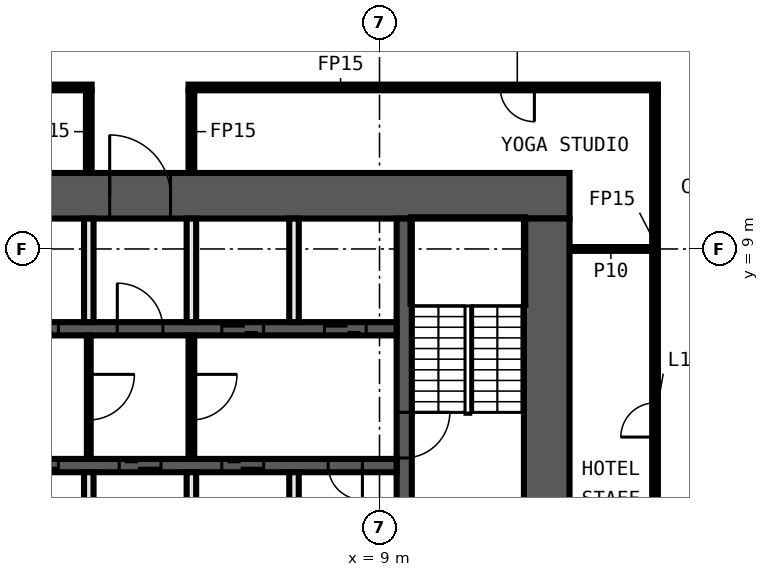
"""IFC4 building model, lengths in metres.
Left out: names, types, materials, properties, quantities, classifications, styles, units other than length and angle.
Written with IfcOpenShell. Run it as: python <this file> out.ifc"""

import sys

from ifc_helpers import new_model, si_unit, direction, frame, frame_2d, origin, place, context, subcontext, project, spatial, rectangle, extrude, element, fill, save


model = new_model("IFC4")
c1 = context("Model", 3, precision=1e-05, world=origin(), true_north=direction((0.0, 1.0)))
c2 = subcontext(c1, "Body", "Model", "MODEL_VIEW")
j1 = project(units=[si_unit("LENGTHUNIT", "METRE"), si_unit("PLANEANGLEUNIT", "RADIAN")], contexts=[c1])
p1 = place(None, origin())
s1 = spatial("IfcSite", under=j1, at=p1, CompositionType="ELEMENT")
p2 = place(p1, origin())
s2 = spatial("IfcBuilding", under=s1, at=p2, CompositionType="ELEMENT")
p3 = place(p2, frame((0.0, 0.0, 73.6)))
s3 = spatial("IfcBuildingStorey", under=s2, at=p3, CompositionType="ELEMENT", Elevation=73.6)
p4 = place(p3, frame((14.0, 9.0, 0.0), z_axis=(0.0, 0.0, 1.0), x_axis=(1.0, 0.0, 0.0)))
e1 = element("IfcWall", 1, at=p4, inside=s3, PredefinedType="PARTITIONING", context=c2, shape_type="SweptSolid", body=[
    extrude(rectangle(XDim=2.175, YDim=0.1, at=frame_2d((1.087, 0.0))), origin(), (0.0, 0.0, 1.0), 3.3),
])
p5 = place(p3, frame((1.425, 13.25, 0.0), z_axis=(0.0, 0.0, 1.0), x_axis=(-1.0, 0.0, 0.0)))
e2 = element("IfcWall", 2, at=p5, inside=s3, PredefinedType="PARTITIONING", context=c2, shape_type="SweptSolid", body=[
    extrude(rectangle(XDim=17.75, YDim=0.15, at=frame_2d((8.875, 0.0))), origin(), (0.0, 0.0, 1.0), 3.3),
])
p6 = place(p5, frame((5.475, 0.0, 0.0)))
e3 = element("IfcOpeningElement", 3, at=p6, cuts=e2, PredefinedType="OPENING", context=c2, shape_type="SweptSolid", body=[
    extrude(rectangle(XDim=0.9, YDim=2.1, at=frame_2d((0.45, 1.05))), frame((0.0, 0.085, 0.0), z_axis=(0.0, -1.0, 0.0), x_axis=(1.0, 0.0, 0.0)), (0.0, 0.0, 1.0), 0.17),
])
p7 = place(p5, frame((13.6, 0.0, 0.0)))
e4 = element("IfcOpeningElement", 4, at=p7, cuts=e2, PredefinedType="OPENING", context=c2, shape_type="SweptSolid", body=[
    extrude(rectangle(XDim=0.9, YDim=2.1, at=frame_2d((0.45, 1.05))), frame((0.0, 0.085, 0.0), z_axis=(0.0, -1.0, 0.0), x_axis=(1.0, 0.0, 0.0)), (0.0, 0.0, 1.0), 0.17),
])
p8 = place(p3, frame((16.325, 13.25, 0.0), z_axis=(0.0, 0.0, 1.0), x_axis=(-1.0, 0.0, 0.0)))
e5 = element("IfcWall", 5, at=p8, inside=s3, PredefinedType="PARTITIONING", context=c2, shape_type="SweptSolid", body=[
    extrude(rectangle(XDim=12.35, YDim=0.15, at=frame_2d((6.175, 0.0))), origin(), (0.0, 0.0, 1.0), 3.3),
])
p9 = place(p8, frame((3.25, 0.0, 0.0)))
e6 = element("IfcOpeningElement", 6, at=p9, cuts=e5, PredefinedType="OPENING", context=c2, shape_type="SweptSolid", body=[
    extrude(rectangle(XDim=0.9, YDim=2.1, at=frame_2d((0.45, 1.05))), frame((0.0, 0.085, 0.0), z_axis=(0.0, -1.0, 0.0), x_axis=(1.0, 0.0, 0.0)), (0.0, 0.0, 1.0), 0.17),
])
p10 = place(p3, frame((16.25, -13.175, 0.0), z_axis=(0.0, 0.0, 1.0), x_axis=(0.0, 1.0, 0.0)))
e7 = element("IfcWall", 7, at=p10, inside=s3, PredefinedType="PARTITIONING", context=c2, shape_type="SweptSolid", body=[
    extrude(rectangle(XDim=26.35, YDim=0.15, at=frame_2d((13.175, 0.0))), origin(), (0.0, 0.0, 1.0), 3.3),
])
p11 = place(p10, frame((8.225, 0.0, 0.0)))
e8 = element("IfcOpeningElement", 8, at=p11, cuts=e7, PredefinedType="OPENING", context=c2, shape_type="SweptSolid", body=[
    extrude(rectangle(XDim=0.9, YDim=2.1, at=frame_2d((0.45, 1.05))), frame((0.0, 0.085, 0.0), z_axis=(0.0, -1.0, 0.0), x_axis=(1.0, 0.0, 0.0)), (0.0, 0.0, 1.0), 0.17),
])
p12 = place(p10, frame((17.225, 0.0, 0.0)))
e9 = element("IfcOpeningElement", 9, at=p12, cuts=e7, PredefinedType="OPENING", context=c2, shape_type="SweptSolid", body=[
    extrude(rectangle(XDim=0.9, YDim=2.1, at=frame_2d((0.45, 1.05))), frame((0.0, 0.085, 0.0), z_axis=(0.0, -1.0, 0.0), x_axis=(1.0, 0.0, 0.0)), (0.0, 0.0, 1.0), 0.17),
])
for number, where, z_axis, x_axis in (
    (10, (4.05, 11.0, 0.0), (0.0, 0.0, 1.0), (0.0, 1.0, 0.0)),
    (11, (1.35, 11.0, 0.0), (0.0, 0.0, 1.0), (0.0, 1.0, 0.0)),
):
    element("IfcWall", number, at=place(p3, frame(where, z_axis=z_axis, x_axis=x_axis)), inside=s3, PredefinedType="PARTITIONING", context=c2, shape_type="SweptSolid", body=[
        extrude(rectangle(XDim=2.175, YDim=0.15, at=frame_2d((1.087, 0.0))), origin(), (0.0, 0.0, 1.0), 3.3),
    ])
p13 = place(p3, frame((-14.0, 10.4, 0.0), z_axis=(0.0, 0.0, 1.0), x_axis=(1.0, 0.0, 0.0)))
e12 = element("IfcWall", 12, at=p13, inside=s3, PredefinedType="SHEAR", context=c2, shape_type="SweptSolid", body=[
    extrude(rectangle(XDim=28.0, YDim=1.2, at=frame_2d((14.0, 0.0))), origin(), (0.0, 0.0, 1.0), 3.3),
])
p14 = place(p13, frame((15.9, 0.0, 0.0)))
e13 = element("IfcOpeningElement", 13, at=p14, cuts=e12, PredefinedType="OPENING", context=c2, shape_type="SweptSolid", body=[
    extrude(rectangle(XDim=1.6, YDim=2.1, at=frame_2d((0.8, 1.05))), frame((0.0, 0.61, 0.0), z_axis=(0.0, -1.0, 0.0), x_axis=(1.0, 0.0, 0.0)), (0.0, 0.0, 1.0), 1.22),
])
p15 = place(p3, frame((13.4, 9.8, 0.0), z_axis=(0.0, 0.0, 1.0), x_axis=(0.0, -1.0, 0.0)))
e14 = element("IfcWall", 14, at=p15, inside=s3, PredefinedType="SHEAR", context=c2, shape_type="SweptSolid", body=[
    extrude(rectangle(XDim=19.6, YDim=1.2, at=frame_2d((9.8, 0.0))), origin(), (0.0, 0.0, 1.0), 3.3),
])
p16 = place(p3, frame((9.65, 9.8, 0.0), z_axis=(0.0, 0.0, 1.0), x_axis=(0.0, -1.0, 0.0)))
e15 = element("IfcWall", 15, at=p16, inside=s3, PredefinedType="SHEAR", context=c2, shape_type="SweptSolid", body=[
    extrude(rectangle(XDim=7.5, YDim=0.4, at=frame_2d((3.75, 0.0))), origin(), (0.0, 0.0, 1.0), 3.3),
])
p17 = place(p16, frame((5.1, 0.0, 0.0)))
e16 = element("IfcOpeningElement", 16, at=p17, cuts=e15, PredefinedType="OPENING", context=c2, shape_type="SweptSolid", body=[
    extrude(rectangle(XDim=1.2, YDim=2.1, at=frame_2d((0.6, 1.05))), frame((0.0, 0.21, 0.0), z_axis=(0.0, -1.0, 0.0), x_axis=(1.0, 0.0, 0.0)), (0.0, 0.0, 1.0), 0.42),
])
p18 = place(p3, frame((-9.45, 6.9, 0.0), z_axis=(0.0, 0.0, 1.0), x_axis=(1.0, 0.0, 0.0)))
e17 = element("IfcWall", 17, at=p18, inside=s3, PredefinedType="SHEAR", context=c2, shape_type="SweptSolid", body=[
    extrude(rectangle(XDim=18.9, YDim=0.35, at=frame_2d((9.45, 0.0))), origin(), (0.0, 0.0, 1.0), 3.3),
])
p19 = place(p18, frame((0.8, 0.0, 0.0)))
e18 = element("IfcOpeningElement", 18, at=p19, cuts=e17, PredefinedType="OPENING", context=c2, shape_type="SweptSolid", body=[
    extrude(rectangle(XDim=1.1, YDim=2.1, at=frame_2d((0.55, 1.05))), frame((0.0, 0.185, 0.0), z_axis=(0.0, -1.0, 0.0), x_axis=(1.0, 0.0, 0.0)), (0.0, 0.0, 1.0), 0.37),
])
p20 = place(p18, frame((3.5, 0.0, 0.0)))
e19 = element("IfcOpeningElement", 19, at=p20, cuts=e17, PredefinedType="OPENING", context=c2, shape_type="SweptSolid", body=[
    extrude(rectangle(XDim=1.1, YDim=2.1, at=frame_2d((0.55, 1.05))), frame((0.0, 0.185, 0.0), z_axis=(0.0, -1.0, 0.0), x_axis=(1.0, 0.0, 0.0)), (0.0, 0.0, 1.0), 0.37),
])
p21 = place(p18, frame((6.2, 0.0, 0.0)))
e20 = element("IfcOpeningElement", 20, at=p21, cuts=e17, PredefinedType="OPENING", context=c2, shape_type="SweptSolid", body=[
    extrude(rectangle(XDim=1.1, YDim=2.1, at=frame_2d((0.55, 1.05))), frame((0.0, 0.185, 0.0), z_axis=(0.0, -1.0, 0.0), x_axis=(1.0, 0.0, 0.0)), (0.0, 0.0, 1.0), 0.37),
])
p22 = place(p18, frame((8.9, 0.0, 0.0)))
e21 = element("IfcOpeningElement", 21, at=p22, cuts=e17, PredefinedType="OPENING", context=c2, shape_type="SweptSolid", body=[
    extrude(rectangle(XDim=1.1, YDim=2.1, at=frame_2d((0.55, 1.05))), frame((0.0, 0.185, 0.0), z_axis=(0.0, -1.0, 0.0), x_axis=(1.0, 0.0, 0.0)), (0.0, 0.0, 1.0), 0.37),
])
p23 = place(p18, frame((11.55, 0.0, 0.0)))
e22 = element("IfcOpeningElement", 22, at=p23, cuts=e17, PredefinedType="OPENING", context=c2, shape_type="SweptSolid", body=[
    extrude(rectangle(XDim=1.2, YDim=2.1, at=frame_2d((0.6, 1.05))), frame((0.0, 0.185, 0.0), z_axis=(0.0, -1.0, 0.0), x_axis=(1.0, 0.0, 0.0)), (0.0, 0.0, 1.0), 0.37),
])
p24 = place(p18, frame((14.3, 0.0, 0.0)))
e23 = element("IfcOpeningElement", 23, at=p24, cuts=e17, PredefinedType="OPENING", context=c2, shape_type="SweptSolid", body=[
    extrude(rectangle(XDim=1.1, YDim=2.1, at=frame_2d((0.55, 1.05))), frame((0.0, 0.185, 0.0), z_axis=(0.0, -1.0, 0.0), x_axis=(1.0, 0.0, 0.0)), (0.0, 0.0, 1.0), 0.37),
])
p25 = place(p18, frame((17.0, 0.0, 0.0)))
e24 = element("IfcOpeningElement", 24, at=p25, cuts=e17, PredefinedType="OPENING", context=c2, shape_type="SweptSolid", body=[
    extrude(rectangle(XDim=1.1, YDim=2.1, at=frame_2d((0.55, 1.05))), frame((0.0, 0.185, 0.0), z_axis=(0.0, -1.0, 0.0), x_axis=(1.0, 0.0, 0.0)), (0.0, 0.0, 1.0), 0.37),
])
p26 = place(p3, frame((9.45, 3.3, 0.0), z_axis=(0.0, 0.0, 1.0), x_axis=(-1.0, 0.0, 0.0)))
e25 = element("IfcWall", 25, at=p26, inside=s3, PredefinedType="SHEAR", context=c2, shape_type="SweptSolid", body=[
    extrude(rectangle(XDim=18.9, YDim=0.35, at=frame_2d((9.45, 0.0))), origin(), (0.0, 0.0, 1.0), 3.3),
])
p27 = place(p26, frame((17.0, 0.0, 0.0)))
e26 = element("IfcOpeningElement", 26, at=p27, cuts=e25, PredefinedType="OPENING", context=c2, shape_type="SweptSolid", body=[
    extrude(rectangle(XDim=1.1, YDim=2.1, at=frame_2d((0.55, 1.05))), frame((0.0, 0.185, 0.0), z_axis=(0.0, -1.0, 0.0), x_axis=(1.0, 0.0, 0.0)), (0.0, 0.0, 1.0), 0.37),
])
p28 = place(p26, frame((14.3, 0.0, 0.0)))
e27 = element("IfcOpeningElement", 27, at=p28, cuts=e25, PredefinedType="OPENING", context=c2, shape_type="SweptSolid", body=[
    extrude(rectangle(XDim=1.1, YDim=2.1, at=frame_2d((0.55, 1.05))), frame((0.0, 0.185, 0.0), z_axis=(0.0, -1.0, 0.0), x_axis=(1.0, 0.0, 0.0)), (0.0, 0.0, 1.0), 0.37),
])
p29 = place(p26, frame((11.6, 0.0, 0.0)))
e28 = element("IfcOpeningElement", 28, at=p29, cuts=e25, PredefinedType="OPENING", context=c2, shape_type="SweptSolid", body=[
    extrude(rectangle(XDim=1.1, YDim=2.1, at=frame_2d((0.55, 1.05))), frame((0.0, 0.185, 0.0), z_axis=(0.0, -1.0, 0.0), x_axis=(1.0, 0.0, 0.0)), (0.0, 0.0, 1.0), 0.37),
])
p30 = place(p26, frame((8.9, 0.0, 0.0)))
e29 = element("IfcOpeningElement", 29, at=p30, cuts=e25, PredefinedType="OPENING", context=c2, shape_type="SweptSolid", body=[
    extrude(rectangle(XDim=1.1, YDim=2.1, at=frame_2d((0.55, 1.05))), frame((0.0, 0.185, 0.0), z_axis=(0.0, -1.0, 0.0), x_axis=(1.0, 0.0, 0.0)), (0.0, 0.0, 1.0), 0.37),
])
p31 = place(p26, frame((6.2, 0.0, 0.0)))
e30 = element("IfcOpeningElement", 30, at=p31, cuts=e25, PredefinedType="OPENING", context=c2, shape_type="SweptSolid", body=[
    extrude(rectangle(XDim=1.1, YDim=2.1, at=frame_2d((0.55, 1.05))), frame((0.0, 0.185, 0.0), z_axis=(0.0, -1.0, 0.0), x_axis=(1.0, 0.0, 0.0)), (0.0, 0.0, 1.0), 0.37),
])
p32 = place(p26, frame((3.5, 0.0, 0.0)))
e31 = element("IfcOpeningElement", 31, at=p32, cuts=e25, PredefinedType="OPENING", context=c2, shape_type="SweptSolid", body=[
    extrude(rectangle(XDim=1.1, YDim=2.1, at=frame_2d((0.55, 1.05))), frame((0.0, 0.185, 0.0), z_axis=(0.0, -1.0, 0.0), x_axis=(1.0, 0.0, 0.0)), (0.0, 0.0, 1.0), 0.37),
])
p33 = place(p26, frame((0.9, 0.0, 0.0)))
e32 = element("IfcOpeningElement", 32, at=p33, cuts=e25, PredefinedType="OPENING", context=c2, shape_type="SweptSolid", body=[
    extrude(rectangle(XDim=0.9, YDim=2.1, at=frame_2d((0.45, 1.05))), frame((0.0, 0.185, 0.0), z_axis=(0.0, -1.0, 0.0), x_axis=(1.0, 0.0, 0.0)), (0.0, 0.0, 1.0), 0.37),
])
for number, where, z_axis, x_axis in (
    (33, (6.75, 0.4, 0.0), (0.0, 0.0, 1.0), (0.0, 1.0, 0.0)),
    (34, (6.75, 7.075, 0.0), (0.0, 0.0, 1.0), (0.0, 1.0, 0.0)),
):
    element("IfcWall", number, at=place(p3, frame(where, z_axis=z_axis, x_axis=x_axis)), inside=s3, PredefinedType="SOLIDWALL", context=c2, shape_type="SweptSolid", body=[
        extrude(rectangle(XDim=2.725, YDim=0.25, at=frame_2d((1.363, 0.0))), origin(), (0.0, 0.0, 1.0), 3.3),
    ])
p34 = place(p3, frame((4.05, 6.725, 0.0), z_axis=(0.0, 0.0, 1.0), x_axis=(0.0, -1.0, 0.0)))
e35 = element("IfcWall", 35, at=p34, inside=s3, PredefinedType="PARTITIONING", context=c2, shape_type="SweptSolid", body=[
    extrude(rectangle(XDim=3.25, YDim=0.15, at=frame_2d((1.625, 0.0))), origin(), (0.0, 0.0, 1.0), 3.3),
])
p35 = place(p34, frame((1.025, 0.0, 0.0)))
e36 = element("IfcOpeningElement", 36, at=p35, cuts=e35, PredefinedType="OPENING", context=c2, shape_type="SweptSolid", body=[
    extrude(rectangle(XDim=1.2, YDim=2.1, at=frame_2d((0.6, 1.05))), frame((0.0, 0.085, 0.0), z_axis=(0.0, -1.0, 0.0), x_axis=(1.0, 0.0, 0.0)), (0.0, 0.0, 1.0), 0.17),
])
for number, where, z_axis, x_axis in (
    (37, (4.05, 0.4, 0.0), (0.0, 0.0, 1.0), (0.0, 1.0, 0.0)),
    (38, (4.05, 7.075, 0.0), (0.0, 0.0, 1.0), (0.0, 1.0, 0.0)),
):
    element("IfcWall", number, at=place(p3, frame(where, z_axis=z_axis, x_axis=x_axis)), inside=s3, PredefinedType="SOLIDWALL", context=c2, shape_type="SweptSolid", body=[
        extrude(rectangle(XDim=2.725, YDim=0.25, at=frame_2d((1.363, 0.0))), origin(), (0.0, 0.0, 1.0), 3.3),
    ])
p36 = place(p3, frame((1.35, 6.725, 0.0), z_axis=(0.0, 0.0, 1.0), x_axis=(0.0, -1.0, 0.0)))
e39 = element("IfcWall", 39, at=p36, inside=s3, PredefinedType="PARTITIONING", context=c2, shape_type="SweptSolid", body=[
    extrude(rectangle(XDim=3.25, YDim=0.1, at=frame_2d((1.625, 0.0))), origin(), (0.0, 0.0, 1.0), 3.3),
])
p37 = place(p36, frame((1.025, 0.0, 0.0)))
e40 = element("IfcOpeningElement", 40, at=p37, cuts=e39, PredefinedType="OPENING", context=c2, shape_type="SweptSolid", body=[
    extrude(rectangle(XDim=1.2, YDim=2.1, at=frame_2d((0.6, 1.05))), frame((0.0, 0.06, 0.0), z_axis=(0.0, -1.0, 0.0), x_axis=(1.0, 0.0, 0.0)), (0.0, 0.0, 1.0), 0.12),
])
for number, where, z_axis, x_axis in (
    (41, (1.35, 0.4, 0.0), (0.0, 0.0, 1.0), (0.0, 1.0, 0.0)),
    (42, (1.35, 7.075, 0.0), (0.0, 0.0, 1.0), (0.0, 1.0, 0.0)),
):
    element("IfcWall", number, at=place(p3, frame(where, z_axis=z_axis, x_axis=x_axis)), inside=s3, PredefinedType="SOLIDWALL", context=c2, shape_type="SweptSolid", body=[
        extrude(rectangle(XDim=2.725, YDim=0.25, at=frame_2d((1.363, 0.0))), origin(), (0.0, 0.0, 1.0), 3.3),
    ])
p38 = place(p12, origin())
e43 = element("IfcDoor", 43, at=p38, inside=s3, OperationType="SINGLE_SWING_RIGHT", PredefinedType="DOOR", context=c2, shape_type="SweptSolid", body=[
    extrude(rectangle(XDim=0.9, YDim=2.1, at=frame_2d((0.45, 1.05))), frame((0.0, 0.025, 0.0), z_axis=(0.0, -1.0, 0.0), x_axis=(1.0, 0.0, 0.0)), (0.0, 0.0, 1.0), 0.05),
])
fill(e9, e43)
p39 = place(p9, origin())
e44 = element("IfcDoor", 44, at=p39, inside=s3, OperationType="SINGLE_SWING_LEFT", PredefinedType="DOOR", context=c2, shape_type="SweptSolid", body=[
    extrude(rectangle(XDim=0.9, YDim=2.1, at=frame_2d((0.45, 1.05))), frame((0.0, 0.025, 0.0), z_axis=(0.0, -1.0, 0.0), x_axis=(1.0, 0.0, 0.0)), (0.0, 0.0, 1.0), 0.05),
])
fill(e6, e44)
p40 = place(p22, origin())
e45 = element("IfcDoor", 45, at=p40, inside=s3, OperationType="DOUBLE_DOOR_SLIDING", PredefinedType="DOOR", context=c2, shape_type="SweptSolid", body=[
    extrude(rectangle(XDim=1.1, YDim=2.1, at=frame_2d((0.55, 1.05))), frame((0.0, 0.025, 0.0), z_axis=(0.0, -1.0, 0.0), x_axis=(1.0, 0.0, 0.0)), (0.0, 0.0, 1.0), 0.05),
])
fill(e21, e45)
p41 = place(p14, origin())
e46 = element("IfcDoor", 46, at=p41, inside=s3, OperationType="DOUBLE_DOOR_SINGLE_SWING", PredefinedType="DOOR", context=c2, shape_type="SweptSolid", body=[
    extrude(rectangle(XDim=1.6, YDim=2.1, at=frame_2d((0.8, 1.05))), frame((0.0, 0.025, 0.0), z_axis=(0.0, -1.0, 0.0), x_axis=(1.0, 0.0, 0.0)), (0.0, 0.0, 1.0), 0.05),
])
fill(e13, e46)
p42 = place(p23, origin())
e47 = element("IfcDoor", 47, at=p42, inside=s3, OperationType="SINGLE_SWING_LEFT", PredefinedType="DOOR", context=c2, shape_type="SweptSolid", body=[
    extrude(rectangle(XDim=1.2, YDim=2.1, at=frame_2d((0.6, 1.05))), frame((0.0, 0.025, 0.0), z_axis=(0.0, -1.0, 0.0), x_axis=(1.0, 0.0, 0.0)), (0.0, 0.0, 1.0), 0.05),
])
fill(e22, e47)
p43 = place(p24, origin())
e48 = element("IfcDoor", 48, at=p43, inside=s3, OperationType="DOUBLE_DOOR_SLIDING", PredefinedType="DOOR", context=c2, shape_type="SweptSolid", body=[
    extrude(rectangle(XDim=1.1, YDim=2.1, at=frame_2d((0.55, 1.05))), frame((0.0, 0.025, 0.0), z_axis=(0.0, -1.0, 0.0), x_axis=(1.0, 0.0, 0.0)), (0.0, 0.0, 1.0), 0.05),
])
fill(e23, e48)
p44 = place(p25, origin())
e49 = element("IfcDoor", 49, at=p44, inside=s3, OperationType="DOUBLE_DOOR_SLIDING", PredefinedType="DOOR", context=c2, shape_type="SweptSolid", body=[
    extrude(rectangle(XDim=1.1, YDim=2.1, at=frame_2d((0.55, 1.05))), frame((0.0, 0.025, 0.0), z_axis=(0.0, -1.0, 0.0), x_axis=(1.0, 0.0, 0.0)), (0.0, 0.0, 1.0), 0.05),
])
fill(e24, e49)
p45 = place(p30, origin())
e50 = element("IfcDoor", 50, at=p45, inside=s3, OperationType="DOUBLE_DOOR_SLIDING", PredefinedType="DOOR", context=c2, shape_type="SweptSolid", body=[
    extrude(rectangle(XDim=1.1, YDim=2.1, at=frame_2d((0.55, 1.05))), frame((0.0, 0.025, 0.0), z_axis=(0.0, -1.0, 0.0), x_axis=(1.0, 0.0, 0.0)), (0.0, 0.0, 1.0), 0.05),
])
fill(e29, e50)
p46 = place(p31, origin())
e51 = element("IfcDoor", 51, at=p46, inside=s3, OperationType="DOUBLE_DOOR_SLIDING", PredefinedType="DOOR", context=c2, shape_type="SweptSolid", body=[
    extrude(rectangle(XDim=1.1, YDim=2.1, at=frame_2d((0.55, 1.05))), frame((0.0, 0.025, 0.0), z_axis=(0.0, -1.0, 0.0), x_axis=(1.0, 0.0, 0.0)), (0.0, 0.0, 1.0), 0.05),
])
fill(e30, e51)
p47 = place(p32, origin())
e52 = element("IfcDoor", 52, at=p47, inside=s3, OperationType="DOUBLE_DOOR_SLIDING", PredefinedType="DOOR", context=c2, shape_type="SweptSolid", body=[
    extrude(rectangle(XDim=1.1, YDim=2.1, at=frame_2d((0.55, 1.05))), frame((0.0, 0.025, 0.0), z_axis=(0.0, -1.0, 0.0), x_axis=(1.0, 0.0, 0.0)), (0.0, 0.0, 1.0), 0.05),
])
fill(e31, e52)
p48 = place(p33, origin())
e53 = element("IfcDoor", 53, at=p48, inside=s3, OperationType="SINGLE_SWING_LEFT", PredefinedType="DOOR", context=c2, shape_type="SweptSolid", body=[
    extrude(rectangle(XDim=0.9, YDim=2.1, at=frame_2d((0.45, 1.05))), frame((0.0, 0.025, 0.0), z_axis=(0.0, -1.0, 0.0), x_axis=(1.0, 0.0, 0.0)), (0.0, 0.0, 1.0), 0.05),
])
fill(e32, e53)
p49 = place(p17, origin())
e54 = element("IfcDoor", 54, at=p49, inside=s3, OperationType="SINGLE_SWING_LEFT", PredefinedType="DOOR", context=c2, shape_type="SweptSolid", body=[
    extrude(rectangle(XDim=1.2, YDim=2.1, at=frame_2d((0.6, 1.05))), frame((0.0, 0.025, 0.0), z_axis=(0.0, -1.0, 0.0), x_axis=(1.0, 0.0, 0.0)), (0.0, 0.0, 1.0), 0.05),
])
fill(e16, e54)
p50 = place(p37, origin())
e55 = element("IfcDoor", 55, at=p50, inside=s3, OperationType="SINGLE_SWING_LEFT", PredefinedType="DOOR", context=c2, shape_type="SweptSolid", body=[
    extrude(rectangle(XDim=1.2, YDim=2.1, at=frame_2d((0.6, 1.05))), frame((0.0, 0.025, 0.0), z_axis=(0.0, -1.0, 0.0), x_axis=(1.0, 0.0, 0.0)), (0.0, 0.0, 1.0), 0.05),
])
fill(e40, e55)
p51 = place(p35, origin())
e56 = element("IfcDoor", 56, at=p51, inside=s3, OperationType="SINGLE_SWING_RIGHT", PredefinedType="DOOR", context=c2, shape_type="SweptSolid", body=[
    extrude(rectangle(XDim=1.2, YDim=2.1, at=frame_2d((0.6, 1.05))), frame((0.0, 0.025, 0.0), z_axis=(0.0, -1.0, 0.0), x_axis=(1.0, 0.0, 0.0)), (0.0, 0.0, 1.0), 0.05),
])
fill(e36, e56)
save(model, sys.argv[1])
